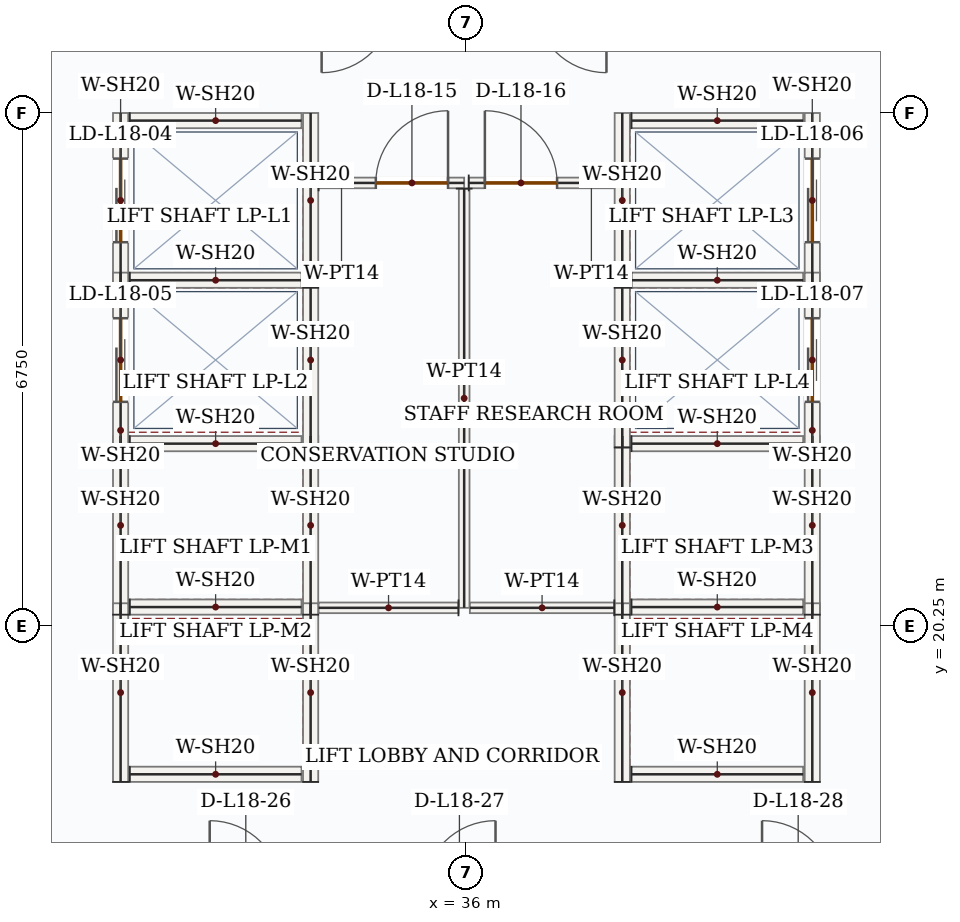
"""IFC4 building model, lengths in metres.
Left out: names, types, materials, properties, quantities, classifications, styles, units other than length and angle.
Written with IfcOpenShell. Run it as: python <this file> out.ifc"""

import sys

from ifc_helpers import new_model, si_unit, direction, frame, frame_2d, origin, place, context, subcontext, project, spatial, rectangle, extrude, source, transform, mapped, element, fill, save


model = new_model("IFC4")
c1 = context("Model", 3, precision=1e-05, world=origin(), true_north=direction((0.0, 1.0)))
c2 = subcontext(c1, "Body", "Model", "MODEL_VIEW")
j1 = project(units=[si_unit("LENGTHUNIT", "METRE"), si_unit("PLANEANGLEUNIT", "RADIAN")], contexts=[c1])
p1 = place(None, origin())
s1 = spatial("IfcSite", under=j1, at=p1, CompositionType="ELEMENT")
p2 = place(p1, origin())
s2 = spatial("IfcBuilding", under=s1, at=p2, CompositionType="ELEMENT")
p3 = place(p2, frame((0.0, 0.0, 83.7)))
s3 = spatial("IfcBuildingStorey", under=s2, at=p3, CompositionType="ELEMENT", Elevation=83.7)
m1 = source(origin(), c2, "Body", "SweptSolid", [
    extrude(rectangle(XDim=2.35, YDim=0.2, at=frame_2d((1.175, 0.0))), origin(), (0.0, 0.0, 1.0), 3.95),
])
for number, where, z_axis, x_axis in (
    (1, (31.45, 20.4, 0.0), (0.0, 0.0, 1.0), (0.0, 1.0, 0.0)),
    (2, (33.95, 20.4, 0.0), (0.0, 0.0, 1.0), (0.0, 1.0, 0.0)),
):
    element("IfcWall", number, at=place(p3, frame(where, z_axis=z_axis, x_axis=x_axis)), inside=s3, PredefinedType="SOLIDWALL", context=c2, shape_type="MappedRepresentation", body=[
        mapped(m1, transform((0.0, 0.0, 0.0), x_axis=(1.0, 0.0, 0.0), y_axis=(0.0, 1.0, 0.0), z_axis=(0.0, 0.0, 1.0), scale=1.0)),
    ])
m2 = source(origin(), c2, "Body", "SweptSolid", [
    extrude(rectangle(XDim=2.26, YDim=0.2, at=frame_2d((1.13, 0.0))), origin(), (0.0, 0.0, 1.0), 3.95),
])
for number, where, z_axis, x_axis in (
    (3, (31.57, 20.5, 0.0), (0.0, 0.0, 1.0), (1.0, 0.0, 0.0)),
    (4, (31.57, 22.65, 0.0), (0.0, 0.0, 1.0), (1.0, 0.0, 0.0)),
):
    element("IfcWall", number, at=place(p3, frame(where, z_axis=z_axis, x_axis=x_axis)), inside=s3, PredefinedType="SOLIDWALL", context=c2, shape_type="MappedRepresentation", body=[
        mapped(m2, transform((0.0, 0.0, 0.0), x_axis=(1.0, 0.0, 0.0), y_axis=(0.0, 1.0, 0.0), z_axis=(0.0, 0.0, 1.0), scale=1.0)),
    ])
for number, where, z_axis, x_axis in (
    (5, (31.45, 18.2, 0.0), (0.0, 0.0, 1.0), (0.0, 1.0, 0.0)),
    (6, (33.95, 18.2, 0.0), (0.0, 0.0, 1.0), (0.0, 1.0, 0.0)),
):
    element("IfcWall", number, at=place(p3, frame(where, z_axis=z_axis, x_axis=x_axis)), inside=s3, PredefinedType="SOLIDWALL", context=c2, shape_type="MappedRepresentation", body=[
        mapped(m1, transform((0.0, 0.0, 0.0), x_axis=(1.0, 0.0, 0.0), y_axis=(0.0, 1.0, 0.0), z_axis=(0.0, 0.0, 1.0), scale=1.0)),
    ])
p4 = place(p3, frame((31.57, 18.3, 0.0), z_axis=(0.0, 0.0, 1.0), x_axis=(1.0, 0.0, 0.0)))
e7 = element("IfcWall", 7, at=p4, inside=s3, PredefinedType="SOLIDWALL", context=c2, shape_type="MappedRepresentation", body=[
    mapped(m2, transform((0.0, 0.0, 0.0), x_axis=(1.0, 0.0, 0.0), y_axis=(0.0, 1.0, 0.0), z_axis=(0.0, 0.0, 1.0), scale=1.0)),
])
for number, where, z_axis, x_axis in (
    (8, (38.05, 20.4, 0.0), (0.0, 0.0, 1.0), (0.0, 1.0, 0.0)),
    (9, (40.55, 20.4, 0.0), (0.0, 0.0, 1.0), (0.0, 1.0, 0.0)),
):
    element("IfcWall", number, at=place(p3, frame(where, z_axis=z_axis, x_axis=x_axis)), inside=s3, PredefinedType="SOLIDWALL", context=c2, shape_type="MappedRepresentation", body=[
        mapped(m1, transform((0.0, 0.0, 0.0), x_axis=(1.0, 0.0, 0.0), y_axis=(0.0, 1.0, 0.0), z_axis=(0.0, 0.0, 1.0), scale=1.0)),
    ])
for number, where, z_axis, x_axis in (
    (10, (38.17, 20.5, 0.0), (0.0, 0.0, 1.0), (1.0, 0.0, 0.0)),
    (11, (38.17, 22.65, 0.0), (0.0, 0.0, 1.0), (1.0, 0.0, 0.0)),
):
    element("IfcWall", number, at=place(p3, frame(where, z_axis=z_axis, x_axis=x_axis)), inside=s3, PredefinedType="SOLIDWALL", context=c2, shape_type="MappedRepresentation", body=[
        mapped(m2, transform((0.0, 0.0, 0.0), x_axis=(1.0, 0.0, 0.0), y_axis=(0.0, 1.0, 0.0), z_axis=(0.0, 0.0, 1.0), scale=1.0)),
    ])
for number, where, z_axis, x_axis in (
    (12, (38.05, 18.2, 0.0), (0.0, 0.0, 1.0), (0.0, 1.0, 0.0)),
    (13, (40.55, 18.2, 0.0), (0.0, 0.0, 1.0), (0.0, 1.0, 0.0)),
):
    element("IfcWall", number, at=place(p3, frame(where, z_axis=z_axis, x_axis=x_axis)), inside=s3, PredefinedType="SOLIDWALL", context=c2, shape_type="MappedRepresentation", body=[
        mapped(m1, transform((0.0, 0.0, 0.0), x_axis=(1.0, 0.0, 0.0), y_axis=(0.0, 1.0, 0.0), z_axis=(0.0, 0.0, 1.0), scale=1.0)),
    ])
p5 = place(p3, frame((38.17, 18.3, 0.0), z_axis=(0.0, 0.0, 1.0), x_axis=(1.0, 0.0, 0.0)))
e14 = element("IfcWall", 14, at=p5, inside=s3, PredefinedType="SOLIDWALL", context=c2, shape_type="MappedRepresentation", body=[
    mapped(m2, transform((0.0, 0.0, 0.0), x_axis=(1.0, 0.0, 0.0), y_axis=(0.0, 1.0, 0.0), z_axis=(0.0, 0.0, 1.0), scale=1.0)),
])
p6 = place(p3, frame((31.45, 24.7, 0.0), z_axis=(0.0, 0.0, 1.0), x_axis=(0.0, 1.0, 0.0)))
e15 = element("IfcWall", 15, at=p6, inside=s3, PredefinedType="SOLIDWALL", context=c2, shape_type="SweptSolid", body=[
    extrude(rectangle(XDim=2.3, YDim=0.2, at=frame_2d((1.15, 0.0))), origin(), (0.0, 0.0, 1.0), 3.95),
])
p7 = place(p6, frame((0.6, 0.0, 0.0)))
e16 = element("IfcOpeningElement", 16, at=p7, cuts=e15, PredefinedType="OPENING", context=c2, shape_type="SweptSolid", body=[
    extrude(rectangle(XDim=1.1, YDim=2.15, at=frame_2d((0.55, 1.075))), frame((0.0, 0.11, 0.0), z_axis=(0.0, -1.0, 0.0), x_axis=(1.0, 0.0, 0.0)), (0.0, 0.0, 1.0), 0.22),
])
m3 = source(origin(), c2, "Body", "SweptSolid", [
    extrude(rectangle(XDim=2.3, YDim=0.2, at=frame_2d((1.15, 0.0))), origin(), (0.0, 0.0, 1.0), 3.95),
])
p8 = place(p3, frame((33.95, 24.7, 0.0), z_axis=(0.0, 0.0, 1.0), x_axis=(0.0, 1.0, 0.0)))
e17 = element("IfcWall", 17, at=p8, inside=s3, PredefinedType="SOLIDWALL", context=c2, shape_type="MappedRepresentation", body=[
    mapped(m3, transform((0.0, 0.0, 0.0), x_axis=(1.0, 0.0, 0.0), y_axis=(0.0, 1.0, 0.0), z_axis=(0.0, 0.0, 1.0), scale=1.0)),
])
for number, where, z_axis, x_axis in (
    (18, (31.57, 24.8, 0.0), (0.0, 0.0, 1.0), (1.0, 0.0, 0.0)),
    (19, (31.57, 26.9, 0.0), (0.0, 0.0, 1.0), (1.0, 0.0, 0.0)),
):
    element("IfcWall", number, at=place(p3, frame(where, z_axis=z_axis, x_axis=x_axis)), inside=s3, PredefinedType="SOLIDWALL", context=c2, shape_type="MappedRepresentation", body=[
        mapped(m2, transform((0.0, 0.0, 0.0), x_axis=(1.0, 0.0, 0.0), y_axis=(0.0, 1.0, 0.0), z_axis=(0.0, 0.0, 1.0), scale=1.0)),
    ])
p9 = place(p3, frame((31.45, 22.6, 0.0), z_axis=(0.0, 0.0, 1.0), x_axis=(0.0, 1.0, 0.0)))
e20 = element("IfcWall", 20, at=p9, inside=s3, PredefinedType="SOLIDWALL", context=c2, shape_type="SweptSolid", body=[
    extrude(rectangle(XDim=2.3, YDim=0.2, at=frame_2d((1.15, 0.0))), origin(), (0.0, 0.0, 1.0), 3.95),
])
p10 = place(p9, frame((0.6, 0.0, 0.0)))
e21 = element("IfcOpeningElement", 21, at=p10, cuts=e20, PredefinedType="OPENING", context=c2, shape_type="SweptSolid", body=[
    extrude(rectangle(XDim=1.1, YDim=2.15, at=frame_2d((0.55, 1.075))), frame((0.0, 0.11, 0.0), z_axis=(0.0, -1.0, 0.0), x_axis=(1.0, 0.0, 0.0)), (0.0, 0.0, 1.0), 0.22),
])
m4 = source(origin(), c2, "Body", "SweptSolid", [
    extrude(rectangle(XDim=2.3, YDim=0.2, at=frame_2d((1.15, 0.0))), origin(), (0.0, 0.0, 1.0), 3.95),
])
p11 = place(p3, frame((33.95, 22.6, 0.0), z_axis=(0.0, 0.0, 1.0), x_axis=(0.0, 1.0, 0.0)))
e22 = element("IfcWall", 22, at=p11, inside=s3, PredefinedType="SOLIDWALL", context=c2, shape_type="MappedRepresentation", body=[
    mapped(m4, transform((0.0, 0.0, 0.0), x_axis=(1.0, 0.0, 0.0), y_axis=(0.0, 1.0, 0.0), z_axis=(0.0, 0.0, 1.0), scale=1.0)),
])
p12 = place(p3, frame((38.05, 24.7, 0.0), z_axis=(0.0, 0.0, 1.0), x_axis=(0.0, 1.0, 0.0)))
e23 = element("IfcWall", 23, at=p12, inside=s3, PredefinedType="SOLIDWALL", context=c2, shape_type="MappedRepresentation", body=[
    mapped(m3, transform((0.0, 0.0, 0.0), x_axis=(1.0, 0.0, 0.0), y_axis=(0.0, 1.0, 0.0), z_axis=(0.0, 0.0, 1.0), scale=1.0)),
])
p13 = place(p3, frame((40.55, 24.7, 0.0), z_axis=(0.0, 0.0, 1.0), x_axis=(0.0, 1.0, 0.0)))
e24 = element("IfcWall", 24, at=p13, inside=s3, PredefinedType="SOLIDWALL", context=c2, shape_type="SweptSolid", body=[
    extrude(rectangle(XDim=2.3, YDim=0.2, at=frame_2d((1.15, 0.0))), origin(), (0.0, 0.0, 1.0), 3.95),
])
p14 = place(p13, frame((0.6, 0.0, 0.0)))
e25 = element("IfcOpeningElement", 25, at=p14, cuts=e24, PredefinedType="OPENING", context=c2, shape_type="SweptSolid", body=[
    extrude(rectangle(XDim=1.1, YDim=2.15, at=frame_2d((0.55, 1.075))), frame((0.0, 0.11, 0.0), z_axis=(0.0, -1.0, 0.0), x_axis=(1.0, 0.0, 0.0)), (0.0, 0.0, 1.0), 0.22),
])
for number, where, z_axis, x_axis in (
    (26, (38.17, 24.8, 0.0), (0.0, 0.0, 1.0), (1.0, 0.0, 0.0)),
    (27, (38.17, 26.9, 0.0), (0.0, 0.0, 1.0), (1.0, 0.0, 0.0)),
):
    element("IfcWall", number, at=place(p3, frame(where, z_axis=z_axis, x_axis=x_axis)), inside=s3, PredefinedType="SOLIDWALL", context=c2, shape_type="MappedRepresentation", body=[
        mapped(m2, transform((0.0, 0.0, 0.0), x_axis=(1.0, 0.0, 0.0), y_axis=(0.0, 1.0, 0.0), z_axis=(0.0, 0.0, 1.0), scale=1.0)),
    ])
p15 = place(p3, frame((38.05, 22.6, 0.0), z_axis=(0.0, 0.0, 1.0), x_axis=(0.0, 1.0, 0.0)))
e28 = element("IfcWall", 28, at=p15, inside=s3, PredefinedType="SOLIDWALL", context=c2, shape_type="MappedRepresentation", body=[
    mapped(m4, transform((0.0, 0.0, 0.0), x_axis=(1.0, 0.0, 0.0), y_axis=(0.0, 1.0, 0.0), z_axis=(0.0, 0.0, 1.0), scale=1.0)),
])
p16 = place(p3, frame((40.55, 22.6, 0.0), z_axis=(0.0, 0.0, 1.0), x_axis=(0.0, 1.0, 0.0)))
e29 = element("IfcWall", 29, at=p16, inside=s3, PredefinedType="SOLIDWALL", context=c2, shape_type="SweptSolid", body=[
    extrude(rectangle(XDim=2.3, YDim=0.2, at=frame_2d((1.15, 0.0))), origin(), (0.0, 0.0, 1.0), 3.95),
])
p17 = place(p16, frame((0.6, 0.0, 0.0)))
e30 = element("IfcOpeningElement", 30, at=p17, cuts=e29, PredefinedType="OPENING", context=c2, shape_type="SweptSolid", body=[
    extrude(rectangle(XDim=1.1, YDim=2.15, at=frame_2d((0.55, 1.075))), frame((0.0, 0.11, 0.0), z_axis=(0.0, -1.0, 0.0), x_axis=(1.0, 0.0, 0.0)), (0.0, 0.0, 1.0), 0.22),
])
p18 = place(p3, frame((34.055, 26.08, 0.0), z_axis=(0.0, 0.0, 1.0), x_axis=(1.0, 0.0, 0.0)))
e31 = element("IfcWall", 31, at=p18, inside=s3, PredefinedType="PARTITIONING", context=c2, shape_type="SweptSolid", body=[
    extrude(rectangle(XDim=1.915, YDim=0.14, at=frame_2d((0.958, 0.0))), origin(), (0.0, 0.0, 1.0), 3.95),
])
p19 = place(p18, frame((0.753, 0.0, 0.0)))
e32 = element("IfcOpeningElement", 32, at=p19, cuts=e31, PredefinedType="OPENING", context=c2, shape_type="SweptSolid", body=[
    extrude(rectangle(XDim=0.95, YDim=2.15, at=frame_2d((0.475, 1.075))), frame((0.0, 0.08, 0.0), z_axis=(0.0, -1.0, 0.0), x_axis=(1.0, 0.0, 0.0)), (0.0, 0.0, 1.0), 0.16),
])
m5 = source(origin(), c2, "Body", "SweptSolid", [
    extrude(rectangle(XDim=5.515, YDim=0.14, at=frame_2d((2.757, 0.0))), origin(), (0.0, 0.0, 1.0), 3.95),
])
p20 = place(p3, frame((35.97, 26.005, 0.0), z_axis=(0.0, 0.0, 1.0), x_axis=(0.0, -1.0, 0.0)))
e33 = element("IfcWall", 33, at=p20, inside=s3, PredefinedType="PARTITIONING", context=c2, shape_type="MappedRepresentation", body=[
    mapped(m5, transform((0.0, 0.0, 0.0), x_axis=(1.0, 0.0, 0.0), y_axis=(0.0, 1.0, 0.0), z_axis=(0.0, 0.0, 1.0), scale=1.0)),
])
m6 = source(origin(), c2, "Body", "SweptSolid", [
    extrude(rectangle(XDim=1.84, YDim=0.14, at=frame_2d((0.92, 0.0))), origin(), (0.0, 0.0, 1.0), 3.95),
])
p21 = place(p3, frame((35.895, 20.49, 0.0), z_axis=(0.0, 0.0, 1.0), x_axis=(-1.0, 0.0, 0.0)))
e34 = element("IfcWall", 34, at=p21, inside=s3, PredefinedType="PARTITIONING", context=c2, shape_type="MappedRepresentation", body=[
    mapped(m6, transform((0.0, 0.0, 0.0), x_axis=(1.0, 0.0, 0.0), y_axis=(0.0, 1.0, 0.0), z_axis=(0.0, 0.0, 1.0), scale=1.0)),
])
p22 = place(p3, frame((36.03, 26.08, 0.0), z_axis=(0.0, 0.0, 1.0), x_axis=(1.0, 0.0, 0.0)))
e35 = element("IfcWall", 35, at=p22, inside=s3, PredefinedType="PARTITIONING", context=c2, shape_type="SweptSolid", body=[
    extrude(rectangle(XDim=1.915, YDim=0.14, at=frame_2d((0.958, 0.0))), origin(), (0.0, 0.0, 1.0), 3.95),
])
p23 = place(p22, frame((0.212, 0.0, 0.0)))
e36 = element("IfcOpeningElement", 36, at=p23, cuts=e35, PredefinedType="OPENING", context=c2, shape_type="SweptSolid", body=[
    extrude(rectangle(XDim=0.95, YDim=2.15, at=frame_2d((0.475, 1.075))), frame((0.0, 0.08, 0.0), z_axis=(0.0, -1.0, 0.0), x_axis=(1.0, 0.0, 0.0)), (0.0, 0.0, 1.0), 0.16),
])
m7 = source(origin(), c2, "Body", "SweptSolid", [
    extrude(rectangle(XDim=1.9, YDim=0.14, at=frame_2d((0.95, 0.0))), origin(), (0.0, 0.0, 1.0), 3.95),
])
p24 = place(p3, frame((37.945, 20.49, 0.0), z_axis=(0.0, 0.0, 1.0), x_axis=(-1.0, 0.0, 0.0)))
e37 = element("IfcWall", 37, at=p24, inside=s3, PredefinedType="PARTITIONING", context=c2, shape_type="MappedRepresentation", body=[
    mapped(m7, transform((0.0, 0.0, 0.0), x_axis=(1.0, 0.0, 0.0), y_axis=(0.0, 1.0, 0.0), z_axis=(0.0, 0.0, 1.0), scale=1.0)),
])
m8 = source(origin(), c2, "Body", "SweptSolid", [
    extrude(rectangle(XDim=1.1, YDim=2.15, at=frame_2d((0.55, 1.075))), frame((0.0, 0.025, 0.0), z_axis=(0.0, -1.0, 0.0), x_axis=(1.0, 0.0, 0.0)), (0.0, 0.0, 1.0), 0.05),
])
p25 = place(p7, origin())
e38 = element("IfcDoor", 38, at=p25, inside=s3, OperationType="DOUBLE_DOOR_SLIDING", PredefinedType="DOOR", context=c2, shape_type="MappedRepresentation", body=[
    mapped(m8, transform((0.0, 0.0, 0.0), x_axis=(1.0, 0.0, 0.0), y_axis=(0.0, 1.0, 0.0), z_axis=(0.0, 0.0, 1.0), scale=1.0)),
])
fill(e16, e38)
p26 = place(p10, origin())
e39 = element("IfcDoor", 39, at=p26, inside=s3, OperationType="DOUBLE_DOOR_SLIDING", PredefinedType="DOOR", context=c2, shape_type="MappedRepresentation", body=[
    mapped(m8, transform((0.0, 0.0, 0.0), x_axis=(1.0, 0.0, 0.0), y_axis=(0.0, 1.0, 0.0), z_axis=(0.0, 0.0, 1.0), scale=1.0)),
])
fill(e21, e39)
p27 = place(p14, origin())
e40 = element("IfcDoor", 40, at=p27, inside=s3, OperationType="DOUBLE_DOOR_SLIDING", PredefinedType="DOOR", context=c2, shape_type="MappedRepresentation", body=[
    mapped(m8, transform((0.0, 0.0, 0.0), x_axis=(1.0, 0.0, 0.0), y_axis=(0.0, 1.0, 0.0), z_axis=(0.0, 0.0, 1.0), scale=1.0)),
])
fill(e25, e40)
p28 = place(p17, origin())
e41 = element("IfcDoor", 41, at=p28, inside=s3, OperationType="DOUBLE_DOOR_SLIDING", PredefinedType="DOOR", context=c2, shape_type="MappedRepresentation", body=[
    mapped(m8, transform((0.0, 0.0, 0.0), x_axis=(1.0, 0.0, 0.0), y_axis=(0.0, 1.0, 0.0), z_axis=(0.0, 0.0, 1.0), scale=1.0)),
])
fill(e30, e41)
m9 = source(origin(), c2, "Body", "SweptSolid", [
    extrude(rectangle(XDim=0.95, YDim=2.15, at=frame_2d((0.475, 1.075))), frame((0.0, 0.025, 0.0), z_axis=(0.0, -1.0, 0.0), x_axis=(1.0, 0.0, 0.0)), (0.0, 0.0, 1.0), 0.05),
])
p29 = place(p19, origin())
e42 = element("IfcDoor", 42, at=p29, inside=s3, OperationType="SINGLE_SWING_RIGHT", PredefinedType="DOOR", context=c2, shape_type="MappedRepresentation", body=[
    mapped(m9, transform((0.0, 0.0, 0.0), x_axis=(1.0, 0.0, 0.0), y_axis=(0.0, 1.0, 0.0), z_axis=(0.0, 0.0, 1.0), scale=1.0)),
])
fill(e32, e42)
p30 = place(p23, origin())
e43 = element("IfcDoor", 43, at=p30, inside=s3, OperationType="SINGLE_SWING_LEFT", PredefinedType="DOOR", context=c2, shape_type="MappedRepresentation", body=[
    mapped(m9, transform((0.0, 0.0, 0.0), x_axis=(1.0, 0.0, 0.0), y_axis=(0.0, 1.0, 0.0), z_axis=(0.0, 0.0, 1.0), scale=1.0)),
])
fill(e36, e43)
save(model, sys.argv[1])
